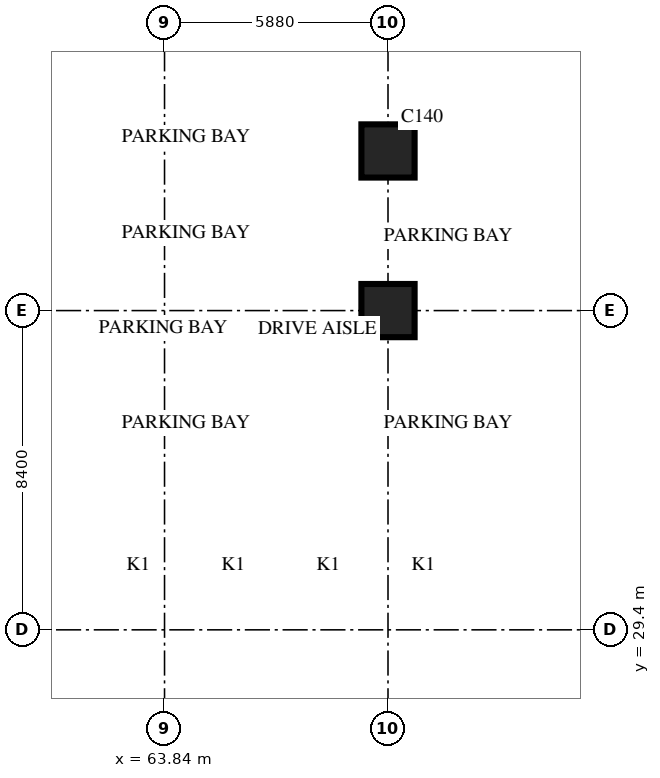
"""IFC4 building model, lengths in metres.
Left out: names, types, materials, properties, quantities, classifications, styles, units other than length and angle.
Written with IfcOpenShell. Run it as: python <this file> out.ifc"""

import sys

from ifc_helpers import new_model, si_unit, direction, frame, origin, origin_2d, place, context, subcontext, project, spatial, rectangle, extrude, source, transform, mapped, element, save


model = new_model("IFC4")
c1 = context("Model", 3, precision=1e-05, world=origin(), true_north=direction((0.0, 1.0)))
c2 = subcontext(c1, "Body", "Model", "MODEL_VIEW")
j1 = project(units=[si_unit("LENGTHUNIT", "METRE"), si_unit("PLANEANGLEUNIT", "RADIAN")], contexts=[c1])
p1 = place(None, origin())
s1 = spatial("IfcSite", under=j1, at=p1, CompositionType="ELEMENT")
p2 = place(p1, origin())
s2 = spatial("IfcBuilding", under=s1, at=p2, CompositionType="ELEMENT")
p3 = place(p2, frame((0.0, 0.0, -13.5)))
s3 = spatial("IfcBuildingStorey", under=s2, at=p3, CompositionType="ELEMENT", Elevation=-13.5)
m1 = source(origin(), c2, "Body", "SweptSolid", [
    extrude(rectangle(XDim=1.4, YDim=1.4, at=origin_2d()), origin(), (0.0, 0.0, 1.0), 4.5),
])
for number, where, z_axis, x_axis in (
    (1, (69.72, 37.8, 0.0), (0.0, 0.0, 1.0), (1.0, 0.0, 0.0)),
    (2, (69.72, 42.0, 0.0), (0.0, 0.0, 1.0), (1.0, 0.0, 0.0)),
):
    element("IfcColumn", number, at=place(p3, frame(where, z_axis=z_axis, x_axis=x_axis)), inside=s3, PredefinedType="COLUMN", context=c2, shape_type="MappedRepresentation", body=[
        mapped(m1, transform((0.0, 0.0, 0.0), scale=1.0)),
    ])
save(model, sys.argv[1])
